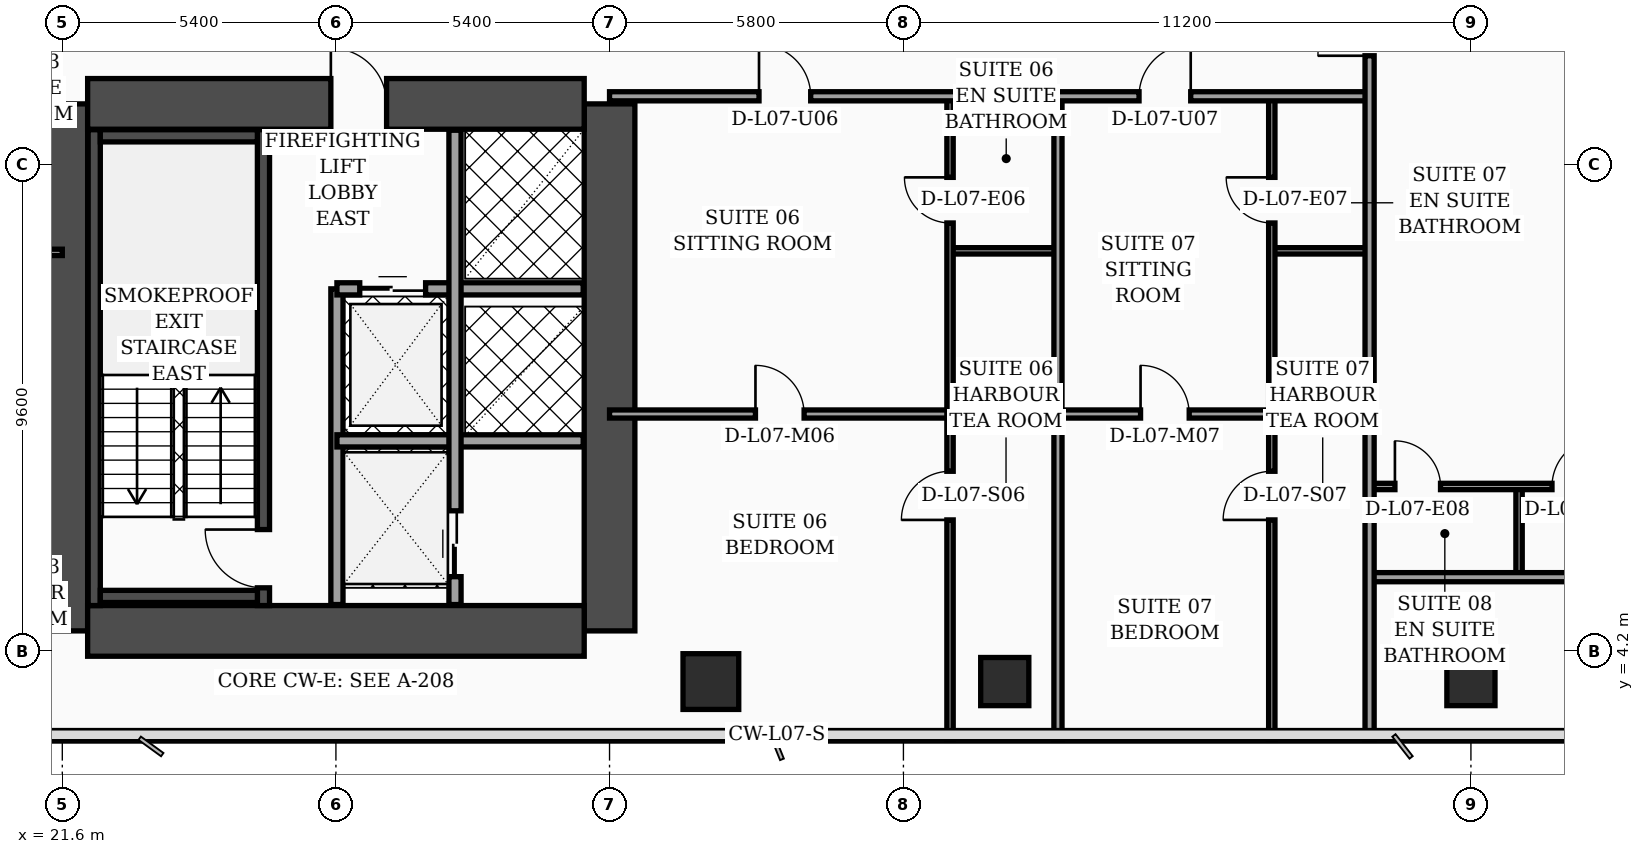
"""IFC4 building model, lengths in metres.
Left out: names, types, materials, properties, quantities, classifications, styles, units other than length and angle.
Written with IfcOpenShell. Run it as: python <this file> out.ifc"""

import sys

from ifc_helpers import new_model, si_unit, direction, frame, frame_2d, origin, origin_2d, place, context, subcontext, project, spatial, rectangle, hollow_rectangle, extrude, element, fill, save


model = new_model("IFC4")
c1 = context("Model", 3, precision=1e-05, world=origin(), true_north=direction((0.0, 1.0)))
c2 = subcontext(c1, "Body", "Model", "MODEL_VIEW")
j1 = project(units=[si_unit("LENGTHUNIT", "METRE"), si_unit("PLANEANGLEUNIT", "RADIAN")], contexts=[c1])
p1 = place(None, origin())
s1 = spatial("IfcSite", under=j1, at=p1, CompositionType="ELEMENT")
p2 = place(p1, origin())
s2 = spatial("IfcBuilding", under=s1, at=p2, CompositionType="ELEMENT")
p3 = place(p2, frame((0.0, 0.0, 34.6)))
s3 = spatial("IfcBuildingStorey", under=s2, at=p3, CompositionType="ELEMENT", Elevation=34.6)
for number, where, z_axis, x_axis in (
    (1, (21.6, 4.6, 0.0), (0.0, 0.0, 1.0), (0.0, 1.0, 0.0)),
    (2, (32.4, 4.6, 0.0), (0.0, 0.0, 1.0), (0.0, 1.0, 0.0)),
):
    element("IfcWall", number, at=place(p3, frame(where, z_axis=z_axis, x_axis=x_axis)), inside=s3, PredefinedType="SHEAR", context=c2, shape_type="SweptSolid", body=[
        extrude(rectangle(XDim=10.4, YDim=1.0, at=frame_2d((5.2, 0.0))), origin(), (0.0, 0.0, 1.0), 3.56),
    ])
p4 = place(p3, frame((22.1, 15.0, 0.0), z_axis=(0.0, 0.0, 1.0), x_axis=(1.0, 0.0, 0.0)))
e3 = element("IfcWall", 3, at=p4, inside=s3, PredefinedType="SHEAR", context=c2, shape_type="SweptSolid", body=[
    extrude(rectangle(XDim=9.8, YDim=1.0, at=frame_2d((4.9, 0.0))), origin(), (0.0, 0.0, 1.0), 3.56),
])
p5 = place(p4, frame((4.8, 0.0, 0.0)))
e4 = element("IfcOpeningElement", 4, at=p5, cuts=e3, PredefinedType="OPENING", context=c2, shape_type="SweptSolid", body=[
    extrude(rectangle(XDim=1.1, YDim=2.2, at=frame_2d((0.55, 1.1))), frame((0.0, 0.51, 0.0), z_axis=(0.0, -1.0, 0.0), x_axis=(1.0, 0.0, 0.0)), (0.0, 0.0, 1.0), 1.02),
])
p6 = place(p3, frame((22.1, 4.6, 0.0), z_axis=(0.0, 0.0, 1.0), x_axis=(1.0, 0.0, 0.0)))
e5 = element("IfcWall", 5, at=p6, inside=s3, PredefinedType="SHEAR", context=c2, shape_type="SweptSolid", body=[
    extrude(rectangle(XDim=9.8, YDim=1.0, at=frame_2d((4.9, 0.0))), origin(), (0.0, 0.0, 1.0), 3.56),
])
p7 = place(p3, frame((22.23, 5.1, 0.0), z_axis=(0.0, 0.0, 1.0), x_axis=(0.0, 1.0, 0.0)))
e6 = element("IfcWall", 6, at=p7, inside=s3, PredefinedType="SOLIDWALL", context=c2, shape_type="SweptSolid", body=[
    extrude(rectangle(XDim=9.39, YDim=0.24, at=frame_2d((4.695, 0.0))), origin(), (0.0, 0.0, 1.0), 3.56),
])
p8 = place(p3, frame((25.57, 5.1, 0.0), z_axis=(0.0, 0.0, 1.0), x_axis=(0.0, 1.0, 0.0)))
e7 = element("IfcWall", 7, at=p8, inside=s3, PredefinedType="SOLIDWALL", context=c2, shape_type="SweptSolid", body=[
    extrude(rectangle(XDim=9.39, YDim=0.24, at=frame_2d((4.695, 0.0))), origin(), (0.0, 0.0, 1.0), 3.56),
])
p9 = place(p8, frame((0.35, 0.0, 0.0)))
e8 = element("IfcOpeningElement", 8, at=p9, cuts=e7, PredefinedType="OPENING", context=c2, shape_type="SweptSolid", body=[
    extrude(rectangle(XDim=1.15, YDim=2.2, at=frame_2d((0.575, 1.1))), frame((0.0, 0.13, 0.0), z_axis=(0.0, -1.0, 0.0), x_axis=(1.0, 0.0, 0.0)), (0.0, 0.0, 1.0), 0.26),
])
for number, where, z_axis, x_axis in (
    (9, (22.35, 5.28, 0.0), (0.0, 0.0, 1.0), (1.0, 0.0, 0.0)),
    (10, (22.35, 14.37, 0.0), (0.0, 0.0, 1.0), (1.0, 0.0, 0.0)),
):
    element("IfcWall", number, at=place(p3, frame(where, z_axis=z_axis, x_axis=x_axis)), inside=s3, PredefinedType="SOLIDWALL", context=c2, shape_type="SweptSolid", body=[
        extrude(rectangle(XDim=3.1, YDim=0.24, at=frame_2d((1.55, 0.0))), origin(), (0.0, 0.0, 1.0), 3.56),
    ])
p10 = place(p3, frame((34.4, 3.6, 0.0), z_axis=(0.0, 0.0, 1.0), x_axis=(1.0, 0.0, 0.0)))
e11 = element("IfcColumn", 11, at=p10, inside=s3, PredefinedType="COLUMN", context=c2, shape_type="SweptSolid", body=[
    extrude(hollow_rectangle(XDim=1.1, YDim=1.1, WallThickness=0.045, at=origin_2d()), origin(), (0.0, 0.0, 1.0), 3.56),
])
for number, where, z_axis, x_axis in (
    (12, (40.2, 3.6, 0.0), (0.0, 0.0, 1.0), (1.0, 0.0, 0.0)),
    (13, (49.4, 3.6, 0.0), (0.0, 0.0, 1.0), (1.0, 0.0, 0.0)),
):
    element("IfcColumn", number, at=place(p3, frame(where, z_axis=z_axis, x_axis=x_axis)), inside=s3, PredefinedType="COLUMN", context=c2, shape_type="SweptSolid", body=[
        extrude(hollow_rectangle(XDim=0.95, YDim=0.95, WallThickness=0.04, at=origin_2d()), origin(), (0.0, 0.0, 1.0), 3.56),
    ])
p11 = place(p3, frame((27.02, 5.12, 0.0), z_axis=(0.0, 0.0, 1.0), x_axis=(0.0, 1.0, 0.0)))
e14 = element("IfcWall", 14, at=p11, inside=s3, PredefinedType="SOLIDWALL", context=c2, shape_type="SweptSolid", body=[
    extrude(rectangle(XDim=6.23, YDim=0.24, at=frame_2d((3.115, 0.0))), origin(), (0.0, 0.0, 1.0), 3.56),
])
p12 = place(p3, frame((27.02, 11.35, 0.0), z_axis=(0.0, 0.0, 1.0), x_axis=(1.0, 0.0, 0.0)))
e15 = element("IfcWall", 15, at=p12, inside=s3, PredefinedType="SOLIDWALL", context=c2, shape_type="SweptSolid", body=[
    extrude(rectangle(XDim=4.86, YDim=0.24, at=frame_2d((2.43, 0.0))), origin(), (0.0, 0.0, 1.0), 3.56),
])
p13 = place(p12, frame((0.45, 0.0, 0.0)))
e16 = element("IfcOpeningElement", 16, at=p13, cuts=e15, PredefinedType="OPENING", context=c2, shape_type="SweptSolid", body=[
    extrude(rectangle(XDim=1.3, YDim=2.35, at=frame_2d((0.65, 1.175))), frame((0.0, 0.13, 0.0), z_axis=(0.0, -1.0, 0.0), x_axis=(1.0, 0.0, 0.0)), (0.0, 0.0, 1.0), 0.26),
])
p14 = place(p3, frame((27.02, 8.35, 0.0), z_axis=(0.0, 0.0, 1.0), x_axis=(1.0, 0.0, 0.0)))
e17 = element("IfcWall", 17, at=p14, inside=s3, PredefinedType="SOLIDWALL", context=c2, shape_type="SweptSolid", body=[
    extrude(rectangle(XDim=4.86, YDim=0.24, at=frame_2d((2.43, 0.0))), origin(), (0.0, 0.0, 1.0), 3.56),
])
p15 = place(p3, frame((29.35, 5.12, 0.0), z_axis=(0.0, 0.0, 1.0), x_axis=(0.0, 1.0, 0.0)))
e18 = element("IfcWall", 18, at=p15, inside=s3, PredefinedType="SOLIDWALL", context=c2, shape_type="SweptSolid", body=[
    extrude(rectangle(XDim=9.36, YDim=0.24, at=frame_2d((4.68, 0.0))), origin(), (0.0, 0.0, 1.0), 3.56),
])
p16 = place(p15, frame((0.55, 0.0, 0.0)))
e19 = element("IfcOpeningElement", 19, at=p16, cuts=e18, PredefinedType="OPENING", context=c2, shape_type="SweptSolid", body=[
    extrude(rectangle(XDim=1.3, YDim=2.35, at=frame_2d((0.65, 1.175))), frame((0.0, 0.13, 0.0), z_axis=(0.0, -1.0, 0.0), x_axis=(1.0, 0.0, 0.0)), (0.0, 0.0, 1.0), 0.26),
])
p17 = place(p3, frame((19.6, 12.07, 0.0), z_axis=(0.0, 0.0, 1.0), x_axis=(1.0, 0.0, 0.0)))
e20 = element("IfcWall", 20, at=p17, inside=s3, PredefinedType="PARTITIONING", context=c2, shape_type="SweptSolid", body=[
    extrude(rectangle(XDim=2.0, YDim=0.125, at=frame_2d((1.0, 0.0))), origin(), (0.0, 0.0, 1.0), 3.56),
])
p18 = place(p3, frame((15.15, 15.15, 0.0), z_axis=(0.0, 0.0, 1.0), x_axis=(1.0, 0.0, 0.0)))
e21 = element("IfcWall", 21, at=p18, inside=s3, PredefinedType="PARTITIONING", context=c2, shape_type="SweptSolid", body=[
    extrude(rectangle(XDim=6.45, YDim=0.18, at=frame_2d((3.225, 0.0))), origin(), (0.0, 0.0, 1.0), 2.34),
])
p19 = place(p18, frame((1.74, 0.0, 0.0)))
e22 = element("IfcOpeningElement", 22, at=p19, cuts=e21, PredefinedType="OPENING", context=c2, shape_type="SweptSolid", body=[
    extrude(rectangle(XDim=1.02, YDim=2.2, at=frame_2d((0.51, 1.1))), frame((0.0, 0.1, 0.0), z_axis=(0.0, -1.0, 0.0), x_axis=(1.0, 0.0, 0.0)), (0.0, 0.0, 1.0), 0.2),
])
p20 = place(p3, frame((39.12, 12.1, 0.0), z_axis=(0.0, 0.0, 1.0), x_axis=(1.0, 0.0, 0.0)))
e23 = element("IfcWall", 23, at=p20, inside=s3, PredefinedType="PARTITIONING", context=c2, shape_type="SweptSolid", body=[
    extrude(rectangle(XDim=2.13, YDim=0.125, at=frame_2d((1.065, 0.0))), origin(), (0.0, 0.0, 1.0), 3.56),
])
p21 = place(p3, frame((32.4, 8.88, 0.0), z_axis=(0.0, 0.0, 1.0), x_axis=(1.0, 0.0, 0.0)))
e24 = element("IfcWall", 24, at=p21, inside=s3, PredefinedType="PARTITIONING", context=c2, shape_type="SweptSolid", body=[
    extrude(rectangle(XDim=6.72, YDim=0.16, at=frame_2d((3.36, 0.0))), origin(), (0.0, 0.0, 1.0), 2.84),
])
p22 = place(p21, frame((2.88, 0.0, 0.0)))
e25 = element("IfcOpeningElement", 25, at=p22, cuts=e24, PredefinedType="OPENING", context=c2, shape_type="SweptSolid", body=[
    extrude(rectangle(XDim=0.96, YDim=2.2, at=frame_2d((0.48, 1.1))), frame((0.0, 0.09, 0.0), z_axis=(0.0, -1.0, 0.0), x_axis=(1.0, 0.0, 0.0)), (0.0, 0.0, 1.0), 0.18),
])
p23 = place(p3, frame((39.12, 2.44, 0.0), z_axis=(0.0, 0.0, 1.0), x_axis=(0.0, 1.0, 0.0)))
e26 = element("IfcWall", 26, at=p23, inside=s3, PredefinedType="PARTITIONING", context=c2, shape_type="SweptSolid", body=[
    extrude(rectangle(XDim=12.71, YDim=0.125, at=frame_2d((6.355, 0.0))), origin(), (0.0, 0.0, 1.0), 2.84),
])
p24 = place(p23, frame((4.35, 0.0, 0.0)))
e27 = element("IfcOpeningElement", 27, at=p24, cuts=e26, PredefinedType="OPENING", context=c2, shape_type="SweptSolid", body=[
    extrude(rectangle(XDim=0.96, YDim=2.2, at=frame_2d((0.48, 1.1))), frame((0.0, 0.073, 0.0), z_axis=(0.0, -1.0, 0.0), x_axis=(1.0, 0.0, 0.0)), (0.0, 0.0, 1.0), 0.145),
])
p25 = place(p23, frame((10.21, 0.0, 0.0)))
e28 = element("IfcOpeningElement", 28, at=p25, cuts=e26, PredefinedType="OPENING", context=c2, shape_type="SweptSolid", body=[
    extrude(rectangle(XDim=0.9, YDim=2.15, at=frame_2d((0.45, 1.075))), frame((0.0, 0.073, 0.0), z_axis=(0.0, -1.0, 0.0), x_axis=(1.0, 0.0, 0.0)), (0.0, 0.0, 1.0), 0.145),
])
p26 = place(p3, frame((45.47, 12.1, 0.0), z_axis=(0.0, 0.0, 1.0), x_axis=(1.0, 0.0, 0.0)))
e29 = element("IfcWall", 29, at=p26, inside=s3, PredefinedType="PARTITIONING", context=c2, shape_type="SweptSolid", body=[
    extrude(rectangle(XDim=1.93, YDim=0.125, at=frame_2d((0.965, 0.0))), origin(), (0.0, 0.0, 1.0), 2.84),
])
p27 = place(p3, frame((41.25, 8.88, 0.0), z_axis=(0.0, 0.0, 1.0), x_axis=(1.0, 0.0, 0.0)))
e30 = element("IfcWall", 30, at=p27, inside=s3, PredefinedType="PARTITIONING", context=c2, shape_type="SweptSolid", body=[
    extrude(rectangle(XDim=4.22, YDim=0.16, at=frame_2d((2.11, 0.0))), origin(), (0.0, 0.0, 1.0), 3.56),
])
p28 = place(p27, frame((1.63, 0.0, 0.0)))
e31 = element("IfcOpeningElement", 31, at=p28, cuts=e30, PredefinedType="OPENING", context=c2, shape_type="SweptSolid", body=[
    extrude(rectangle(XDim=0.96, YDim=2.2, at=frame_2d((0.48, 1.1))), frame((0.0, 0.09, 0.0), z_axis=(0.0, -1.0, 0.0), x_axis=(1.0, 0.0, 0.0)), (0.0, 0.0, 1.0), 0.18),
])
p29 = place(p3, frame((45.47, 2.44, 0.0), z_axis=(0.0, 0.0, 1.0), x_axis=(0.0, 1.0, 0.0)))
e32 = element("IfcWall", 32, at=p29, inside=s3, PredefinedType="PARTITIONING", context=c2, shape_type="SweptSolid", body=[
    extrude(rectangle(XDim=12.71, YDim=0.125, at=frame_2d((6.355, 0.0))), origin(), (0.0, 0.0, 1.0), 3.04),
])
p30 = place(p29, frame((4.35, 0.0, 0.0)))
e33 = element("IfcOpeningElement", 33, at=p30, cuts=e32, PredefinedType="OPENING", context=c2, shape_type="SweptSolid", body=[
    extrude(rectangle(XDim=0.96, YDim=2.2, at=frame_2d((0.48, 1.1))), frame((0.0, 0.073, 0.0), z_axis=(0.0, -1.0, 0.0), x_axis=(1.0, 0.0, 0.0)), (0.0, 0.0, 1.0), 0.145),
])
p31 = place(p29, frame((10.21, 0.0, 0.0)))
e34 = element("IfcOpeningElement", 34, at=p31, cuts=e32, PredefinedType="OPENING", context=c2, shape_type="SweptSolid", body=[
    extrude(rectangle(XDim=0.9, YDim=2.15, at=frame_2d((0.45, 1.075))), frame((0.0, 0.073, 0.0), z_axis=(0.0, -1.0, 0.0), x_axis=(1.0, 0.0, 0.0)), (0.0, 0.0, 1.0), 0.145),
])
p32 = place(p3, frame((41.25, 2.44, 0.0), z_axis=(0.0, 0.0, 1.0), x_axis=(0.0, 1.0, 0.0)))
e35 = element("IfcWall", 35, at=p32, inside=s3, PredefinedType="PARTITIONING", context=c2, shape_type="SweptSolid", body=[
    extrude(rectangle(XDim=12.71, YDim=0.16, at=frame_2d((6.355, 0.0))), origin(), (0.0, 0.0, 1.0), 3.04),
])
p33 = place(p3, frame((32.4, 15.15, 0.0), z_axis=(0.0, 0.0, 1.0), x_axis=(1.0, 0.0, 0.0)))
e36 = element("IfcWall", 36, at=p33, inside=s3, PredefinedType="PARTITIONING", context=c2, shape_type="SweptSolid", body=[
    extrude(rectangle(XDim=15.0, YDim=0.18, at=frame_2d((7.5, 0.0))), origin(), (0.0, 0.0, 1.0), 2.84),
])
p34 = place(p33, frame((2.95, 0.0, 0.0)))
e37 = element("IfcOpeningElement", 37, at=p34, cuts=e36, PredefinedType="OPENING", context=c2, shape_type="SweptSolid", body=[
    extrude(rectangle(XDim=1.02, YDim=2.2, at=frame_2d((0.51, 1.1))), frame((0.0, 0.1, 0.0), z_axis=(0.0, -1.0, 0.0), x_axis=(1.0, 0.0, 0.0)), (0.0, 0.0, 1.0), 0.2),
])
p35 = place(p33, frame((10.45, 0.0, 0.0)))
e38 = element("IfcOpeningElement", 38, at=p35, cuts=e36, PredefinedType="OPENING", context=c2, shape_type="SweptSolid", body=[
    extrude(rectangle(XDim=1.02, YDim=2.2, at=frame_2d((0.51, 1.1))), frame((0.0, 0.1, 0.0), z_axis=(0.0, -1.0, 0.0), x_axis=(1.0, 0.0, 0.0)), (0.0, 0.0, 1.0), 0.2),
])
p36 = place(p3, frame((50.35, 5.66, 0.0), z_axis=(0.0, 0.0, 1.0), x_axis=(0.0, 1.0, 0.0)))
e39 = element("IfcWall", 39, at=p36, inside=s3, PredefinedType="PARTITIONING", context=c2, shape_type="SweptSolid", body=[
    extrude(rectangle(XDim=1.79, YDim=0.125, at=frame_2d((0.895, 0.0))), origin(), (0.0, 0.0, 1.0), 3.56),
])
p37 = place(p3, frame((47.4, 7.45, 0.0), z_axis=(0.0, 0.0, 1.0), x_axis=(1.0, 0.0, 0.0)))
e40 = element("IfcWall", 40, at=p37, inside=s3, PredefinedType="PARTITIONING", context=c2, shape_type="SweptSolid", body=[
    extrude(rectangle(XDim=15.56, YDim=0.125, at=frame_2d((7.78, 0.0))), origin(), (0.0, 0.0, 1.0), 2.84),
])
p38 = place(p37, frame((0.5, 0.0, 0.0)))
e41 = element("IfcOpeningElement", 41, at=p38, cuts=e40, PredefinedType="OPENING", context=c2, shape_type="SweptSolid", body=[
    extrude(rectangle(XDim=0.9, YDim=2.15, at=frame_2d((0.45, 1.075))), frame((0.0, 0.073, 0.0), z_axis=(0.0, -1.0, 0.0), x_axis=(1.0, 0.0, 0.0)), (0.0, 0.0, 1.0), 0.145),
])
p39 = place(p37, frame((3.6, 0.0, 0.0)))
e42 = element("IfcOpeningElement", 42, at=p39, cuts=e40, PredefinedType="OPENING", context=c2, shape_type="SweptSolid", body=[
    extrude(rectangle(XDim=0.96, YDim=2.2, at=frame_2d((0.48, 1.1))), frame((0.0, 0.073, 0.0), z_axis=(0.0, -1.0, 0.0), x_axis=(1.0, 0.0, 0.0)), (0.0, 0.0, 1.0), 0.145),
])
p40 = place(p3, frame((47.4, 5.66, 0.0), z_axis=(0.0, 0.0, 1.0), x_axis=(1.0, 0.0, 0.0)))
e43 = element("IfcWall", 43, at=p40, inside=s3, PredefinedType="PARTITIONING", context=c2, shape_type="SweptSolid", body=[
    extrude(rectangle(XDim=13.0, YDim=0.18, at=frame_2d((6.5, 0.0))), origin(), (0.0, 0.0, 1.0), 2.84),
])
p41 = place(p3, frame((47.4, 2.44, 0.0), z_axis=(0.0, 0.0, 1.0), x_axis=(0.0, 1.0, 0.0)))
e44 = element("IfcWall", 44, at=p41, inside=s3, PredefinedType="PARTITIONING", context=c2, shape_type="SweptSolid", body=[
    extrude(rectangle(XDim=27.84, YDim=0.18, at=frame_2d((13.92, 0.0))), origin(), (0.0, 0.0, 1.0), 2.84),
])
p42 = place(p41, frame((13.51, 0.0, 0.0)))
e45 = element("IfcOpeningElement", 45, at=p42, cuts=e44, PredefinedType="OPENING", context=c2, shape_type="SweptSolid", body=[
    extrude(rectangle(XDim=1.02, YDim=2.2, at=frame_2d((0.51, 1.1))), frame((0.0, 0.1, 0.0), z_axis=(0.0, -1.0, 0.0), x_axis=(1.0, 0.0, 0.0)), (0.0, 0.0, 1.0), 0.2),
])
p43 = place(p41, frame((21.52, 0.0, 0.0)))
e46 = element("IfcOpeningElement", 46, at=p43, cuts=e44, PredefinedType="OPENING", context=c2, shape_type="SweptSolid", body=[
    extrude(rectangle(XDim=1.02, YDim=2.2, at=frame_2d((0.51, 1.1))), frame((0.0, 0.1, 0.0), z_axis=(0.0, -1.0, 0.0), x_axis=(1.0, 0.0, 0.0)), (0.0, 0.0, 1.0), 0.2),
])
p44 = place(p13, origin())
e47 = element("IfcDoor", 47, at=p44, inside=s3, OperationType="DOUBLE_DOOR_SLIDING", PredefinedType="DOOR", context=c2, shape_type="SweptSolid", body=[
    extrude(rectangle(XDim=1.3, YDim=2.35, at=frame_2d((0.65, 1.175))), frame((0.0, 0.025, 0.0), z_axis=(0.0, -1.0, 0.0), x_axis=(1.0, 0.0, 0.0)), (0.0, 0.0, 1.0), 0.05),
])
fill(e16, e47)
p45 = place(p16, origin())
e48 = element("IfcDoor", 48, at=p45, inside=s3, OperationType="DOUBLE_DOOR_SLIDING", PredefinedType="DOOR", context=c2, shape_type="SweptSolid", body=[
    extrude(rectangle(XDim=1.3, YDim=2.35, at=frame_2d((0.65, 1.175))), frame((0.0, 0.025, 0.0), z_axis=(0.0, -1.0, 0.0), x_axis=(1.0, 0.0, 0.0)), (0.0, 0.0, 1.0), 0.05),
])
fill(e19, e48)
p46 = place(p22, origin())
e49 = element("IfcDoor", 49, at=p46, inside=s3, OperationType="SINGLE_SWING_LEFT", PredefinedType="DOOR", context=c2, shape_type="SweptSolid", body=[
    extrude(rectangle(XDim=0.96, YDim=2.2, at=frame_2d((0.48, 1.1))), frame((0.0, 0.025, 0.0), z_axis=(0.0, -1.0, 0.0), x_axis=(1.0, 0.0, 0.0)), (0.0, 0.0, 1.0), 0.05),
])
fill(e25, e49)
p47 = place(p24, origin())
e50 = element("IfcDoor", 50, at=p47, inside=s3, OperationType="SINGLE_SWING_LEFT", PredefinedType="DOOR", context=c2, shape_type="SweptSolid", body=[
    extrude(rectangle(XDim=0.96, YDim=2.2, at=frame_2d((0.48, 1.1))), frame((0.0, 0.025, 0.0), z_axis=(0.0, -1.0, 0.0), x_axis=(1.0, 0.0, 0.0)), (0.0, 0.0, 1.0), 0.05),
])
fill(e27, e50)
p48 = place(p25, origin())
e51 = element("IfcDoor", 51, at=p48, inside=s3, OperationType="SINGLE_SWING_RIGHT", PredefinedType="DOOR", context=c2, shape_type="SweptSolid", body=[
    extrude(rectangle(XDim=0.9, YDim=2.15, at=frame_2d((0.45, 1.075))), frame((0.0, 0.025, 0.0), z_axis=(0.0, -1.0, 0.0), x_axis=(1.0, 0.0, 0.0)), (0.0, 0.0, 1.0), 0.05),
])
fill(e28, e51)
p49 = place(p28, origin())
e52 = element("IfcDoor", 52, at=p49, inside=s3, OperationType="SINGLE_SWING_LEFT", PredefinedType="DOOR", context=c2, shape_type="SweptSolid", body=[
    extrude(rectangle(XDim=0.96, YDim=2.2, at=frame_2d((0.48, 1.1))), frame((0.0, 0.025, 0.0), z_axis=(0.0, -1.0, 0.0), x_axis=(1.0, 0.0, 0.0)), (0.0, 0.0, 1.0), 0.05),
])
fill(e31, e52)
p50 = place(p30, origin())
e53 = element("IfcDoor", 53, at=p50, inside=s3, OperationType="SINGLE_SWING_LEFT", PredefinedType="DOOR", context=c2, shape_type="SweptSolid", body=[
    extrude(rectangle(XDim=0.96, YDim=2.2, at=frame_2d((0.48, 1.1))), frame((0.0, 0.025, 0.0), z_axis=(0.0, -1.0, 0.0), x_axis=(1.0, 0.0, 0.0)), (0.0, 0.0, 1.0), 0.05),
])
fill(e33, e53)
p51 = place(p31, origin())
e54 = element("IfcDoor", 54, at=p51, inside=s3, OperationType="SINGLE_SWING_RIGHT", PredefinedType="DOOR", context=c2, shape_type="SweptSolid", body=[
    extrude(rectangle(XDim=0.9, YDim=2.15, at=frame_2d((0.45, 1.075))), frame((0.0, 0.025, 0.0), z_axis=(0.0, -1.0, 0.0), x_axis=(1.0, 0.0, 0.0)), (0.0, 0.0, 1.0), 0.05),
])
fill(e34, e54)
p52 = place(p34, origin())
e55 = element("IfcDoor", 55, at=p52, inside=s3, OperationType="SINGLE_SWING_LEFT", PredefinedType="DOOR", context=c2, shape_type="SweptSolid", body=[
    extrude(rectangle(XDim=1.02, YDim=2.2, at=frame_2d((0.51, 1.1))), frame((0.0, 0.025, 0.0), z_axis=(0.0, -1.0, 0.0), x_axis=(1.0, 0.0, 0.0)), (0.0, 0.0, 1.0), 0.05),
])
fill(e37, e55)
p53 = place(p35, origin())
e56 = element("IfcDoor", 56, at=p53, inside=s3, OperationType="SINGLE_SWING_RIGHT", PredefinedType="DOOR", context=c2, shape_type="SweptSolid", body=[
    extrude(rectangle(XDim=1.02, YDim=2.2, at=frame_2d((0.51, 1.1))), frame((0.0, 0.025, 0.0), z_axis=(0.0, -1.0, 0.0), x_axis=(1.0, 0.0, 0.0)), (0.0, 0.0, 1.0), 0.05),
])
fill(e38, e56)
p54 = place(p38, origin())
e57 = element("IfcDoor", 57, at=p54, inside=s3, OperationType="SINGLE_SWING_LEFT", PredefinedType="DOOR", context=c2, shape_type="SweptSolid", body=[
    extrude(rectangle(XDim=0.9, YDim=2.15, at=frame_2d((0.45, 1.075))), frame((0.0, 0.025, 0.0), z_axis=(0.0, -1.0, 0.0), x_axis=(1.0, 0.0, 0.0)), (0.0, 0.0, 1.0), 0.05),
])
fill(e41, e57)
p55 = place(p39, origin())
e58 = element("IfcDoor", 58, at=p55, inside=s3, OperationType="SINGLE_SWING_RIGHT", PredefinedType="DOOR", context=c2, shape_type="SweptSolid", body=[
    extrude(rectangle(XDim=0.96, YDim=2.2, at=frame_2d((0.48, 1.1))), frame((0.0, 0.025, 0.0), z_axis=(0.0, -1.0, 0.0), x_axis=(1.0, 0.0, 0.0)), (0.0, 0.0, 1.0), 0.05),
])
fill(e42, e58)
p56 = place(p42, origin())
e59 = element("IfcDoor", 59, at=p56, inside=s3, OperationType="SINGLE_SWING_LEFT", PredefinedType="DOOR", context=c2, shape_type="SweptSolid", body=[
    extrude(rectangle(XDim=1.02, YDim=2.2, at=frame_2d((0.51, 1.1))), frame((0.0, 0.025, 0.0), z_axis=(0.0, -1.0, 0.0), x_axis=(1.0, 0.0, 0.0)), (0.0, 0.0, 1.0), 0.05),
])
fill(e45, e59)
p57 = place(p9, origin())
e60 = element("IfcDoor", 60, at=p57, inside=s3, OperationType="SINGLE_SWING_RIGHT", PredefinedType="DOOR", context=c2, shape_type="SweptSolid", body=[
    extrude(rectangle(XDim=1.15, YDim=2.2, at=frame_2d((0.575, 1.1))), frame((0.0, 0.025, 0.0), z_axis=(0.0, -1.0, 0.0), x_axis=(1.0, 0.0, 0.0)), (0.0, 0.0, 1.0), 0.05),
])
fill(e8, e60)
p58 = place(p5, origin())
e61 = element("IfcDoor", 61, at=p58, inside=s3, OperationType="SINGLE_SWING_LEFT", PredefinedType="DOOR", context=c2, shape_type="SweptSolid", body=[
    extrude(rectangle(XDim=1.1, YDim=2.2, at=frame_2d((0.55, 1.1))), frame((0.0, 0.025, 0.0), z_axis=(0.0, -1.0, 0.0), x_axis=(1.0, 0.0, 0.0)), (0.0, 0.0, 1.0), 0.05),
])
fill(e4, e61)
save(model, sys.argv[1])
